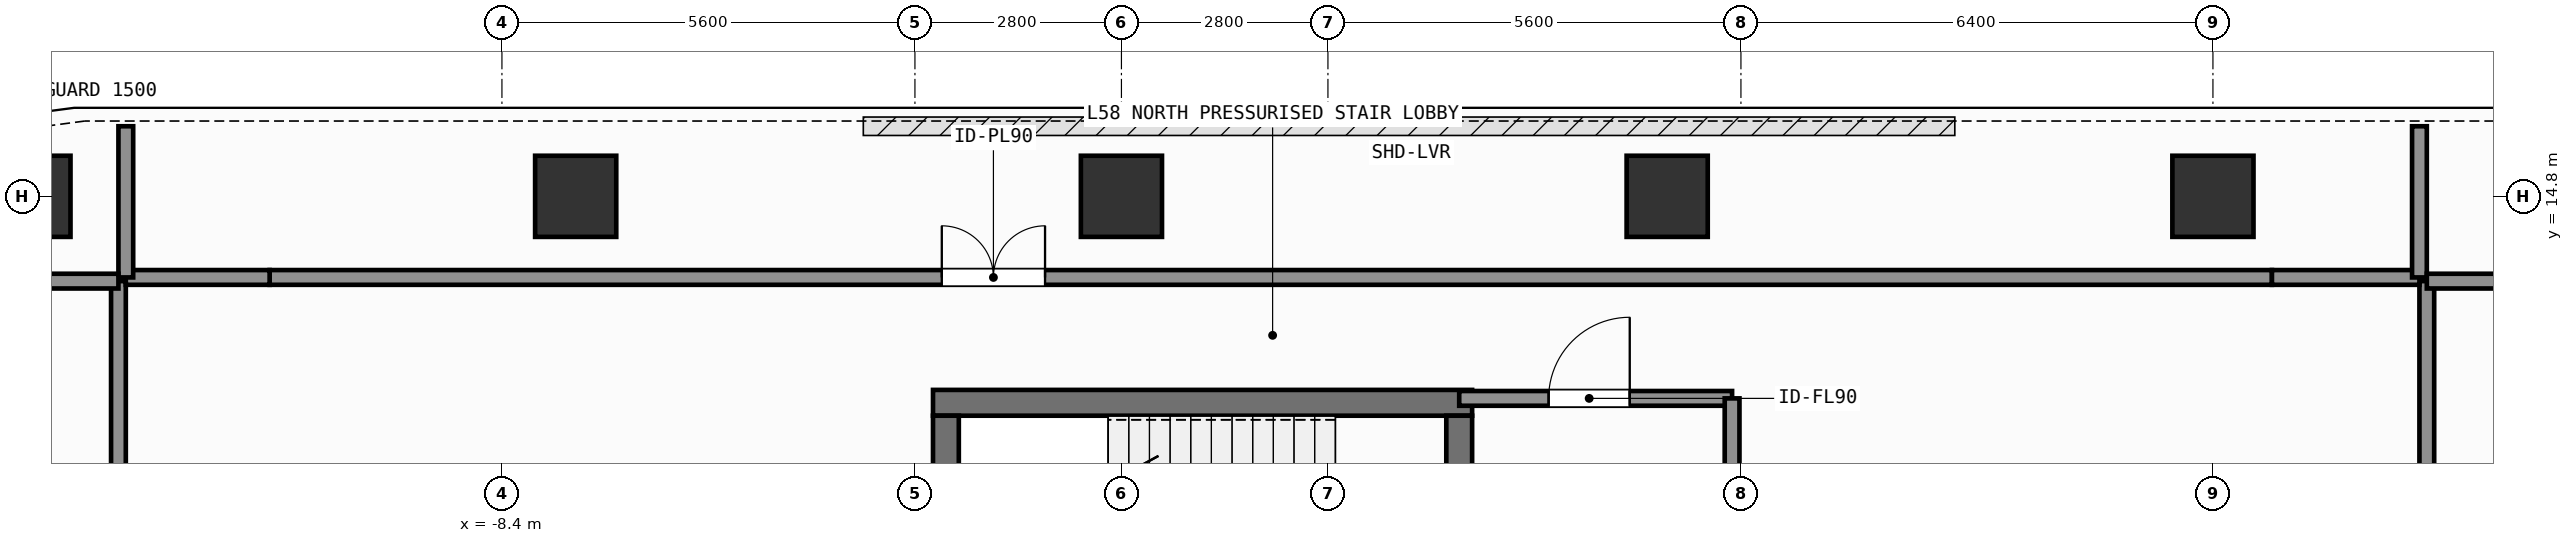
"""IFC4 building model, lengths in metres.
Left out: names, types, materials, properties, quantities, classifications, styles, units other than length and angle.
Written with IfcOpenShell. Run it as: python <this file> out.ifc"""

import sys

from ifc_helpers import new_model, si_unit, direction, frame, frame_2d, origin, origin_2d, place, context, subcontext, project, spatial, rectangle, extrude, element, fill, save


model = new_model("IFC4")
c1 = context("Model", 3, precision=1e-05, world=origin(), true_north=direction((0.0, 1.0)))
c2 = subcontext(c1, "Body", "Model", "MODEL_VIEW")
j1 = project(units=[si_unit("LENGTHUNIT", "METRE"), si_unit("PLANEANGLEUNIT", "RADIAN")], contexts=[c1])
p1 = place(None, origin())
s1 = spatial("IfcSite", under=j1, at=p1, CompositionType="ELEMENT")
p2 = place(p1, origin())
s2 = spatial("IfcBuilding", under=s1, at=p2, CompositionType="ELEMENT")
p3 = place(p2, frame((0.0, 0.0, 235.2)))
s3 = spatial("IfcBuildingStorey", under=s2, at=p3, CompositionType="ELEMENT", Elevation=235.2)
p4 = place(p3, frame((-2.555, 12.0, 0.0), z_axis=(0.0, 0.0, 1.0), x_axis=(1.0, 0.0, 0.0)))
e1 = element("IfcWall", 1, at=p4, inside=s3, PredefinedType="SHEAR", context=c2, shape_type="SweptSolid", body=[
    extrude(rectangle(XDim=7.31, YDim=0.35, at=frame_2d((3.655, 0.0))), origin(), (0.0, 0.0, 1.0), 7.8),
])
p5 = place(p3, frame((-2.38, 8.9, 0.0), z_axis=(0.0, 0.0, 1.0), x_axis=(0.0, 1.0, 0.0)))
e2 = element("IfcWall", 2, at=p5, inside=s3, PredefinedType="SHEAR", context=c2, shape_type="SweptSolid", body=[
    extrude(rectangle(XDim=2.925, YDim=0.35, at=frame_2d((1.462, 0.0))), origin(), (0.0, 0.0, 1.0), 7.8),
])
p6 = place(p3, frame((4.58, 11.825, 0.0), z_axis=(0.0, 0.0, 1.0), x_axis=(0.0, -1.0, 0.0)))
e3 = element("IfcWall", 3, at=p6, inside=s3, PredefinedType="SHEAR", context=c2, shape_type="SweptSolid", body=[
    extrude(rectangle(XDim=2.925, YDim=0.35, at=frame_2d((1.462, 0.0))), origin(), (0.0, 0.0, 1.0), 7.8),
])
p7 = place(p6, frame((0.913, 0.0, 0.0)))
e4 = element("IfcOpeningElement", 4, at=p7, cuts=e3, PredefinedType="OPENING", context=c2, shape_type="SweptSolid", body=[
    extrude(rectangle(XDim=1.1, YDim=2.15, at=frame_2d((0.55, 1.075))), frame((0.0, 0.185, 0.0), z_axis=(0.0, -1.0, 0.0), x_axis=(1.0, 0.0, 0.0)), (0.0, 0.0, 1.0), 0.37),
])
for number, where, z_axis, x_axis in (
    (5, (-14.8, 14.8, 0.0), (0.0, 0.0, 1.0), (1.0, 0.0, 0.0)),
    (6, (-7.4, 14.8, 0.0), (0.0, 0.0, 1.0), (1.0, 0.0, 0.0)),
    (7, (0.0, 14.8, 0.0), (0.0, 0.0, 1.0), (1.0, 0.0, 0.0)),
    (8, (7.4, 14.8, 0.0), (0.0, 0.0, 1.0), (1.0, 0.0, 0.0)),
    (9, (14.8, 14.8, 0.0), (0.0, 0.0, 1.0), (1.0, 0.0, 0.0)),
):
    element("IfcColumn", number, at=place(p3, frame(where, z_axis=z_axis, x_axis=x_axis)), inside=s3, PredefinedType="COLUMN", context=c2, shape_type="SweptSolid", body=[
        extrude(rectangle(XDim=1.1, YDim=1.1, at=origin_2d()), origin(), (0.0, 0.0, 1.0), 7.8),
    ])
p8 = place(p3, frame((4.58, 12.06, 0.0), z_axis=(0.0, 0.0, 1.0), x_axis=(1.0, 0.0, 0.0)))
e10 = element("IfcWall", 10, at=p8, inside=s3, PredefinedType="SOLIDWALL", context=c2, shape_type="SweptSolid", body=[
    extrude(rectangle(XDim=3.7, YDim=0.2, at=frame_2d((1.85, 0.0))), origin(), (0.0, 0.0, 1.0), 7.58),
])
p9 = place(p8, frame((1.212, 0.0, 0.0)))
e11 = element("IfcOpeningElement", 11, at=p9, cuts=e10, PredefinedType="OPENING", context=c2, shape_type="SweptSolid", body=[
    extrude(rectangle(XDim=1.1, YDim=2.15, at=frame_2d((0.55, 1.075))), frame((0.0, 0.11, 0.0), z_axis=(0.0, -1.0, 0.0), x_axis=(1.0, 0.0, 0.0)), (0.0, 0.0, 1.0), 0.22),
])
p10 = place(p3, frame((-11.55, 13.7, 0.0), z_axis=(0.0, 0.0, 1.0), x_axis=(1.0, 0.0, 0.0)))
e12 = element("IfcWall", 12, at=p10, inside=s3, PredefinedType="SOLIDWALL", context=c2, shape_type="SweptSolid", body=[
    extrude(rectangle(XDim=27.15, YDim=0.2, at=frame_2d((13.575, 0.0))), origin(), (0.0, 0.0, 1.0), 7.58),
])
p11 = place(p10, frame((9.114, 0.0, 0.0)))
e13 = element("IfcOpeningElement", 13, at=p11, cuts=e12, PredefinedType="OPENING", context=c2, shape_type="SweptSolid", body=[
    extrude(rectangle(XDim=1.4, YDim=2.2, at=frame_2d((0.7, 1.1))), frame((0.0, 0.11, 0.0), z_axis=(0.0, -1.0, 0.0), x_axis=(1.0, 0.0, 0.0)), (0.0, 0.0, 1.0), 0.22),
])
p12 = place(p3, frame((-13.6, 0.08, 0.0), z_axis=(0.0, 0.0, 1.0), x_axis=(0.0, 1.0, 0.0)))
e14 = element("IfcWall", 14, at=p12, inside=s3, PredefinedType="SOLIDWALL", context=c2, shape_type="SweptSolid", body=[
    extrude(rectangle(XDim=13.57, YDim=0.2, at=frame_2d((6.785, 0.0))), origin(), (0.0, 0.0, 1.0), 7.58),
])
p13 = place(p12, frame((5.52, 0.0, 0.0)))
e15 = element("IfcOpeningElement", 15, at=p13, cuts=e14, PredefinedType="OPENING", context=c2, shape_type="SweptSolid", body=[
    extrude(rectangle(XDim=1.1, YDim=2.15, at=frame_2d((0.55, 1.075))), frame((0.0, 0.11, 0.0), z_axis=(0.0, -1.0, 0.0), x_axis=(1.0, 0.0, 0.0)), (0.0, 0.0, 1.0), 0.22),
])
p14 = place(p3, frame((17.7, 6.88, 0.0), z_axis=(0.0, 0.0, 1.0), x_axis=(0.0, 1.0, 0.0)))
e16 = element("IfcWall", 16, at=p14, inside=s3, PredefinedType="SOLIDWALL", context=c2, shape_type="SweptSolid", body=[
    extrude(rectangle(XDim=6.77, YDim=0.2, at=frame_2d((3.385, 0.0))), origin(), (0.0, 0.0, 1.0), 7.58),
])
p15 = place(p14, frame((2.835, 0.0, 0.0)))
e17 = element("IfcOpeningElement", 17, at=p15, cuts=e16, PredefinedType="OPENING", context=c2, shape_type="SweptSolid", body=[
    extrude(rectangle(XDim=1.1, YDim=2.15, at=frame_2d((0.55, 1.075))), frame((0.0, 0.11, 0.0), z_axis=(0.0, -1.0, 0.0), x_axis=(1.0, 0.0, 0.0)), (0.0, 0.0, 1.0), 0.22),
])
p16 = place(p3, frame((8.28, 8.8, 0.0), z_axis=(0.0, 0.0, 1.0), x_axis=(0.0, 1.0, 0.0)))
e18 = element("IfcWall", 18, at=p16, inside=s3, PredefinedType="SOLIDWALL", context=c2, shape_type="SweptSolid", body=[
    extrude(rectangle(XDim=3.26, YDim=0.2, at=frame_2d((1.63, 0.0))), origin(), (0.0, 0.0, 1.0), 7.58),
])
p17 = place(p3, frame((-13.5, 13.7, 0.0), z_axis=(0.0, 0.0, 1.0), x_axis=(1.0, 0.0, 0.0)))
e19 = element("IfcWall", 19, at=p17, inside=s3, PredefinedType="SOLIDWALL", context=c2, shape_type="SweptSolid", body=[
    extrude(rectangle(XDim=1.95, YDim=0.2, at=frame_2d((0.975, 0.0))), origin(), (0.0, 0.0, 1.0), 7.58),
])
p18 = place(p3, frame((15.6, 13.7, 0.0), z_axis=(0.0, 0.0, 1.0), x_axis=(1.0, 0.0, 0.0)))
e20 = element("IfcWall", 20, at=p18, inside=s3, PredefinedType="SOLIDWALL", context=c2, shape_type="SweptSolid", body=[
    extrude(rectangle(XDim=2.0, YDim=0.2, at=frame_2d((1.0, 0.0))), origin(), (0.0, 0.0, 1.0), 7.58),
])
for number, where, z_axis, x_axis in (
    (21, (-13.5, 13.7, 0.0), (0.0, 0.0, 1.0), (0.0, 1.0, 0.0)),
    (22, (17.6, 13.7, 0.0), (0.0, 0.0, 1.0), (0.0, 1.0, 0.0)),
):
    element("IfcWall", number, at=place(p3, frame(where, z_axis=z_axis, x_axis=x_axis)), inside=s3, PredefinedType="SOLIDWALL", context=c2, shape_type="SweptSolid", body=[
        extrude(rectangle(XDim=2.05, YDim=0.2, at=frame_2d((1.025, 0.0))), origin(), (0.0, 0.0, 1.0), 7.58),
    ])
p19 = place(p3, frame((-16.08, 13.65, 0.0), z_axis=(0.0, 0.0, 1.0), x_axis=(1.0, 0.0, 0.0)))
e23 = element("IfcWall", 23, at=p19, inside=s3, PredefinedType="SOLIDWALL", context=c2, shape_type="SweptSolid", body=[
    extrude(rectangle(XDim=2.48, YDim=0.2, at=frame_2d((1.24, 0.0))), origin(), (0.0, 0.0, 1.0), 7.58),
])
p20 = place(p3, frame((17.7, 13.65, 0.0), z_axis=(0.0, 0.0, 1.0), x_axis=(1.0, 0.0, 0.0)))
e24 = element("IfcWall", 24, at=p20, inside=s3, PredefinedType="SOLIDWALL", context=c2, shape_type="SweptSolid", body=[
    extrude(rectangle(XDim=6.18, YDim=0.2, at=frame_2d((3.09, 0.0))), origin(), (0.0, 0.0, 1.0), 7.58),
])
p21 = place(p9, origin())
e25 = element("IfcDoor", 25, at=p21, inside=s3, OperationType="SINGLE_SWING_RIGHT", PredefinedType="DOOR", context=c2, shape_type="SweptSolid", body=[
    extrude(rectangle(XDim=1.1, YDim=2.15, at=frame_2d((0.55, 1.075))), frame((0.0, 0.025, 0.0), z_axis=(0.0, -1.0, 0.0), x_axis=(1.0, 0.0, 0.0)), (0.0, 0.0, 1.0), 0.05),
])
fill(e11, e25)
p22 = place(p11, origin())
e26 = element("IfcDoor", 26, at=p22, inside=s3, OperationType="SINGLE_SWING_LEFT", PredefinedType="DOOR", context=c2, shape_type="SweptSolid", body=[
    extrude(rectangle(XDim=1.4, YDim=2.2, at=frame_2d((0.7, 1.1))), frame((0.0, 0.025, 0.0), z_axis=(0.0, -1.0, 0.0), x_axis=(1.0, 0.0, 0.0)), (0.0, 0.0, 1.0), 0.05),
])
fill(e13, e26)
save(model, sys.argv[1])
